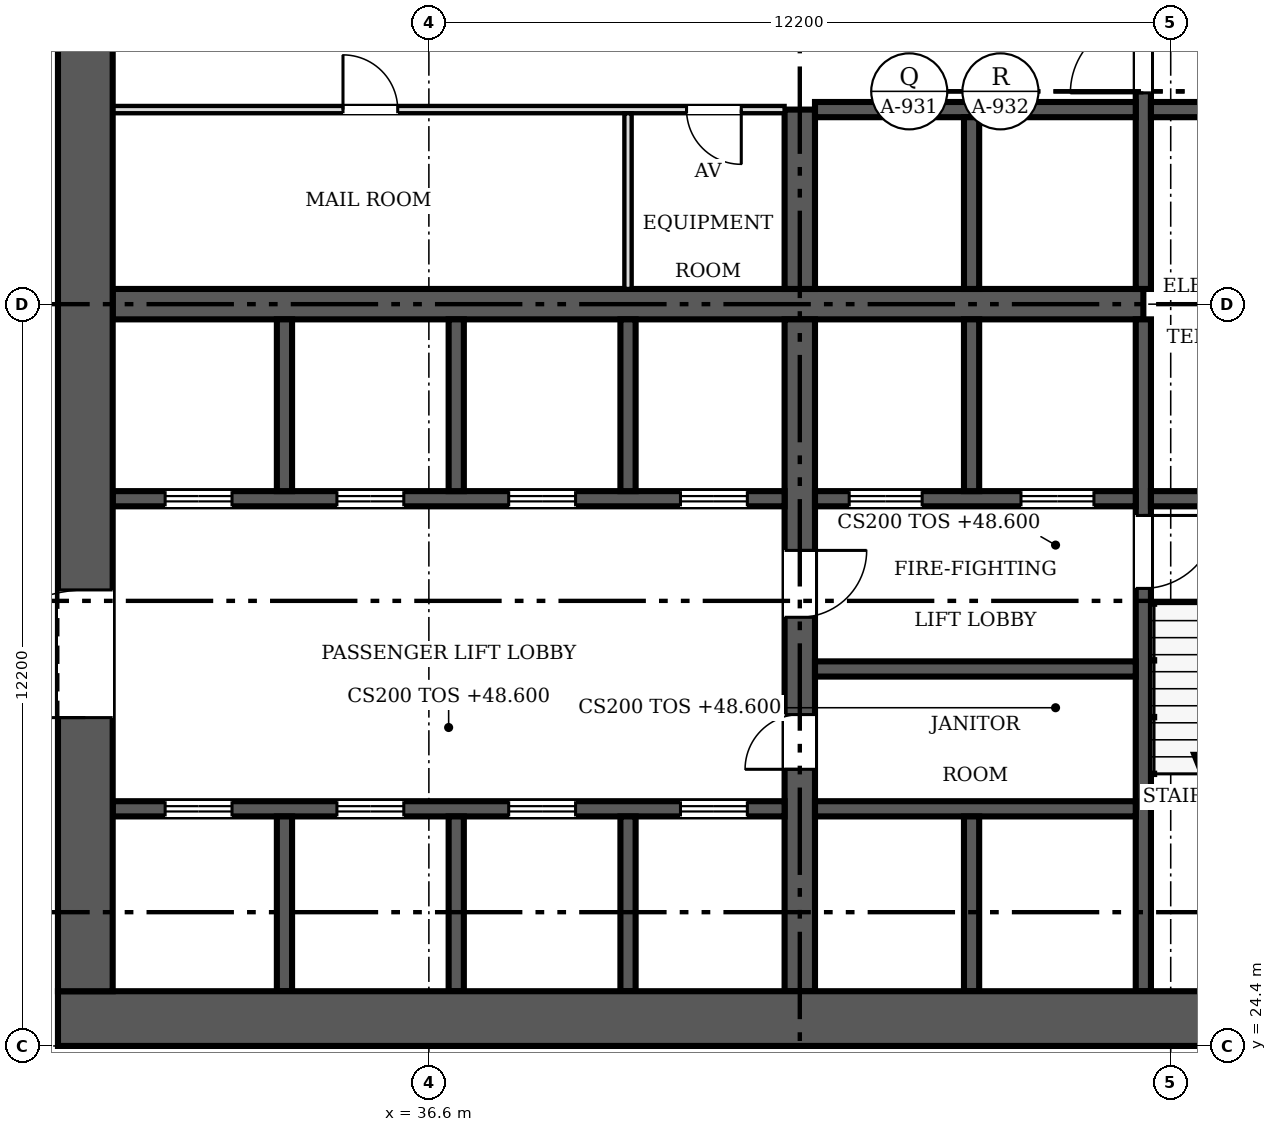
"""IFC4 building model, lengths in metres.
Left out: names, types, materials, properties, quantities, classifications, styles, units other than length and angle.
Written with IfcOpenShell. Run it as: python <this file> out.ifc"""

import sys

from ifc_helpers import new_model, si_unit, direction, frame, frame_2d, origin, place, context, subcontext, project, spatial, rectangle, extrude, source, transform, mapped, element, fill, save


model = new_model("IFC4")
c1 = context("Model", 3, precision=1e-05, world=origin(), true_north=direction((0.0, 1.0)))
c2 = subcontext(c1, "Body", "Model", "MODEL_VIEW")
j1 = project(units=[si_unit("LENGTHUNIT", "METRE"), si_unit("PLANEANGLEUNIT", "RADIAN")], contexts=[c1])
p1 = place(None, origin())
s1 = spatial("IfcSite", under=j1, at=p1, CompositionType="ELEMENT")
p2 = place(p1, origin())
s2 = spatial("IfcBuilding", under=s1, at=p2, CompositionType="ELEMENT")
p3 = place(p2, frame((0.0, 0.0, 48.6)))
s3 = spatial("IfcBuildingStorey", under=s2, at=p3, CompositionType="ELEMENT", Elevation=48.6)
p4 = place(p3, frame((54.9, 24.85, 0.0), z_axis=(0.0, 0.0, 1.0), x_axis=(-1.0, 0.0, 0.0)))
e1 = element("IfcWall", 1, at=p4, inside=s3, PredefinedType="SHEAR", context=c2, shape_type="SweptSolid", body=[
    extrude(rectangle(XDim=24.4, YDim=0.9, at=frame_2d((12.2, 0.0))), origin(), (0.0, 0.0, 1.0), 3.8),
])
m1 = source(origin(), c2, "Body", "SweptSolid", [
    extrude(rectangle(XDim=1.2, YDim=2.1, at=frame_2d((0.6, 1.05))), frame((0.0, 0.46, 0.0), z_axis=(0.0, -1.0, 0.0), x_axis=(1.0, 0.0, 0.0)), (0.0, 0.0, 1.0), 0.92),
])
p5 = place(p4, frame((1.5, 0.0, 0.0)))
e2 = element("IfcOpeningElement", 2, at=p5, cuts=e1, PredefinedType="OPENING", context=c2, shape_type="MappedRepresentation", body=[
    mapped(m1, transform((0.0, 0.0, 0.0), scale=1.0)),
])
p6 = place(p3, frame((30.95, 25.3, 0.0), z_axis=(0.0, 0.0, 1.0), x_axis=(0.0, 1.0, 0.0)))
e3 = element("IfcWall", 3, at=p6, inside=s3, PredefinedType="SHEAR", context=c2, shape_type="SweptSolid", body=[
    extrude(rectangle(XDim=22.6, YDim=0.9, at=frame_2d((11.3, 0.0))), origin(), (0.0, 0.0, 1.0), 3.8),
])
m2 = source(origin(), c2, "Body", "SweptSolid", [
    extrude(rectangle(XDim=2.1, YDim=2.4, at=frame_2d((1.05, 1.2))), frame((0.0, 0.46, 0.0), z_axis=(0.0, -1.0, 0.0), x_axis=(1.0, 0.0, 0.0)), (0.0, 0.0, 1.0), 0.92),
])
p7 = place(p6, frame((4.5, 0.0, 0.0)))
e4 = element("IfcOpeningElement", 4, at=p7, cuts=e3, PredefinedType="OPENING", context=c2, shape_type="MappedRepresentation", body=[
    mapped(m2, transform((0.0, 0.0, 0.0), scale=1.0)),
])
p8 = place(p6, frame((16.0, 0.0, 0.0)))
e5 = element("IfcOpeningElement", 5, at=p8, cuts=e3, PredefinedType="OPENING", context=c2, shape_type="MappedRepresentation", body=[
    mapped(m2, transform((0.0, 0.0, 0.0), scale=1.0)),
])
p9 = place(p3, frame((31.4, 36.6, 0.0), z_axis=(0.0, 0.0, 1.0), x_axis=(1.0, 0.0, 0.0)))
e6 = element("IfcWall", 6, at=p9, inside=s3, PredefinedType="SHEAR", context=c2, shape_type="SweptSolid", body=[
    extrude(rectangle(XDim=16.95, YDim=0.5, at=frame_2d((8.475, 0.0))), origin(), (0.0, 0.0, 1.0), 3.8),
])
p10 = place(p3, frame((42.7, 36.35, 0.0), z_axis=(0.0, 0.0, 1.0), x_axis=(0.0, -1.0, 0.0)))
e7 = element("IfcWall", 7, at=p10, inside=s3, PredefinedType="SHEAR", context=c2, shape_type="SweptSolid", body=[
    extrude(rectangle(XDim=11.05, YDim=0.5, at=frame_2d((5.525, 0.0))), origin(), (0.0, 0.0, 1.0), 3.8),
])
m3 = source(origin(), c2, "Body", "SweptSolid", [
    extrude(rectangle(XDim=0.9, YDim=2.1, at=frame_2d((0.45, 1.05))), frame((0.0, 0.26, 0.0), z_axis=(0.0, -1.0, 0.0), x_axis=(1.0, 0.0, 0.0)), (0.0, 0.0, 1.0), 0.52),
])
p11 = place(p10, frame((6.5, 0.0, 0.0)))
e8 = element("IfcOpeningElement", 8, at=p11, cuts=e7, PredefinedType="OPENING", context=c2, shape_type="MappedRepresentation", body=[
    mapped(m3, transform((0.0, 0.0, 0.0), scale=1.0)),
])
m4 = source(origin(), c2, "Body", "SweptSolid", [
    extrude(rectangle(XDim=1.1, YDim=2.1, at=frame_2d((0.55, 1.05))), frame((0.0, 0.26, 0.0), z_axis=(0.0, -1.0, 0.0), x_axis=(1.0, 0.0, 0.0)), (0.0, 0.0, 1.0), 0.52),
])
p12 = place(p10, frame((3.8, 0.0, 0.0)))
e9 = element("IfcOpeningElement", 9, at=p12, cuts=e7, PredefinedType="OPENING", context=c2, shape_type="MappedRepresentation", body=[
    mapped(m4, transform((0.0, 0.0, 0.0), scale=1.0)),
])
p13 = place(p3, frame((42.7, 36.85, 0.0), z_axis=(0.0, 0.0, 1.0), x_axis=(0.0, 1.0, 0.0)))
e10 = element("IfcWall", 10, at=p13, inside=s3, PredefinedType="SHEAR", context=c2, shape_type="SweptSolid", body=[
    extrude(rectangle(XDim=2.95, YDim=0.5, at=frame_2d((1.475, 0.0))), origin(), (0.0, 0.0, 1.0), 3.8),
])
p14 = place(p3, frame((48.35, 36.35, 0.0), z_axis=(0.0, 0.0, 1.0), x_axis=(0.0, -1.0, 0.0)))
e11 = element("IfcWall", 11, at=p14, inside=s3, PredefinedType="SOLIDWALL", context=c2, shape_type="SweptSolid", body=[
    extrude(rectangle(XDim=11.05, YDim=0.25, at=frame_2d((5.525, 0.0))), origin(), (0.0, 0.0, 1.0), 3.8),
])
m5 = source(origin(), c2, "Body", "SweptSolid", [
    extrude(rectangle(XDim=1.2, YDim=2.1, at=frame_2d((0.6, 1.05))), frame((0.0, 0.135, 0.0), z_axis=(0.0, -1.0, 0.0), x_axis=(1.0, 0.0, 0.0)), (0.0, 0.0, 1.0), 0.27),
])
p15 = place(p14, frame((3.225, 0.0, 0.0)))
e12 = element("IfcOpeningElement", 12, at=p15, cuts=e11, PredefinedType="OPENING", context=c2, shape_type="MappedRepresentation", body=[
    mapped(m5, transform((0.0, 0.0, 0.0), scale=1.0)),
])
p16 = place(p3, frame((48.35, 47.9, 0.0), z_axis=(0.0, 0.0, 1.0), x_axis=(0.0, -1.0, 0.0)))
e13 = element("IfcWall", 13, at=p16, inside=s3, PredefinedType="SOLIDWALL", context=c2, shape_type="SweptSolid", body=[
    extrude(rectangle(XDim=11.05, YDim=0.25, at=frame_2d((5.525, 0.0))), origin(), (0.0, 0.0, 1.0), 3.8),
])
p17 = place(p16, frame((6.625, 0.0, 0.0)))
e14 = element("IfcOpeningElement", 14, at=p17, cuts=e13, PredefinedType="OPENING", context=c2, shape_type="MappedRepresentation", body=[
    mapped(m5, transform((0.0, 0.0, 0.0), scale=1.0)),
])
p18 = place(p3, frame((42.45, 33.4, 0.0), z_axis=(0.0, 0.0, 1.0), x_axis=(-1.0, 0.0, 0.0)))
e15 = element("IfcWall", 15, at=p18, inside=s3, PredefinedType="SOLIDWALL", context=c2, shape_type="SweptSolid", body=[
    extrude(rectangle(XDim=11.05, YDim=0.25, at=frame_2d((5.525, 0.0))), origin(), (0.0, 0.0, 1.0), 3.8),
])
m6 = source(origin(), c2, "Body", "SweptSolid", [
    extrude(rectangle(XDim=1.1, YDim=2.1, at=frame_2d((0.55, 1.05))), frame((0.0, 0.135, 0.0), z_axis=(0.0, -1.0, 0.0), x_axis=(1.0, 0.0, 0.0)), (0.0, 0.0, 1.0), 0.27),
])
p19 = place(p18, frame((9.087, 0.0, 0.0)))
e16 = element("IfcOpeningElement", 16, at=p19, cuts=e15, PredefinedType="OPENING", context=c2, shape_type="MappedRepresentation", body=[
    mapped(m6, transform((0.0, 0.0, 0.0), scale=1.0)),
])
p20 = place(p18, frame((6.262, 0.0, 0.0)))
e17 = element("IfcOpeningElement", 17, at=p20, cuts=e15, PredefinedType="OPENING", context=c2, shape_type="MappedRepresentation", body=[
    mapped(m6, transform((0.0, 0.0, 0.0), scale=1.0)),
])
p21 = place(p18, frame((3.438, 0.0, 0.0)))
e18 = element("IfcOpeningElement", 18, at=p21, cuts=e15, PredefinedType="OPENING", context=c2, shape_type="MappedRepresentation", body=[
    mapped(m6, transform((0.0, 0.0, 0.0), scale=1.0)),
])
p22 = place(p18, frame((0.613, 0.0, 0.0)))
e19 = element("IfcOpeningElement", 19, at=p22, cuts=e15, PredefinedType="OPENING", context=c2, shape_type="MappedRepresentation", body=[
    mapped(m6, transform((0.0, 0.0, 0.0), scale=1.0)),
])
p23 = place(p3, frame((48.225, 33.4, 0.0), z_axis=(0.0, 0.0, 1.0), x_axis=(-1.0, 0.0, 0.0)))
e20 = element("IfcWall", 20, at=p23, inside=s3, PredefinedType="SOLIDWALL", context=c2, shape_type="SweptSolid", body=[
    extrude(rectangle(XDim=5.275, YDim=0.25, at=frame_2d((2.638, 0.0))), origin(), (0.0, 0.0, 1.0), 3.8),
])
p24 = place(p23, frame((3.512, 0.0, 0.0)))
e21 = element("IfcOpeningElement", 21, at=p24, cuts=e20, PredefinedType="OPENING", context=c2, shape_type="MappedRepresentation", body=[
    mapped(m5, transform((0.0, 0.0, 0.0), scale=1.0)),
])
p25 = place(p23, frame((0.688, 0.0, 0.0)))
e22 = element("IfcOpeningElement", 22, at=p25, cuts=e20, PredefinedType="OPENING", context=c2, shape_type="MappedRepresentation", body=[
    mapped(m5, transform((0.0, 0.0, 0.0), scale=1.0)),
])
p26 = place(p3, frame((48.475, 33.4, 0.0), z_axis=(0.0, 0.0, 1.0), x_axis=(1.0, 0.0, 0.0)))
e23 = element("IfcWall", 23, at=p26, inside=s3, PredefinedType="SOLIDWALL", context=c2, shape_type="SweptSolid", body=[
    extrude(rectangle(XDim=3.525, YDim=0.25, at=frame_2d((1.762, 0.0))), origin(), (0.0, 0.0, 1.0), 3.8),
])
p27 = place(p3, frame((31.4, 28.3, 0.0), z_axis=(0.0, 0.0, 1.0), x_axis=(1.0, 0.0, 0.0)))
e24 = element("IfcWall", 24, at=p27, inside=s3, PredefinedType="SOLIDWALL", context=c2, shape_type="SweptSolid", body=[
    extrude(rectangle(XDim=11.05, YDim=0.25, at=frame_2d((5.525, 0.0))), origin(), (0.0, 0.0, 1.0), 3.8),
])
p28 = place(p27, frame((0.863, 0.0, 0.0)))
e25 = element("IfcOpeningElement", 25, at=p28, cuts=e24, PredefinedType="OPENING", context=c2, shape_type="MappedRepresentation", body=[
    mapped(m6, transform((0.0, 0.0, 0.0), scale=1.0)),
])
p29 = place(p27, frame((3.688, 0.0, 0.0)))
e26 = element("IfcOpeningElement", 26, at=p29, cuts=e24, PredefinedType="OPENING", context=c2, shape_type="MappedRepresentation", body=[
    mapped(m6, transform((0.0, 0.0, 0.0), scale=1.0)),
])
p30 = place(p27, frame((6.512, 0.0, 0.0)))
e27 = element("IfcOpeningElement", 27, at=p30, cuts=e24, PredefinedType="OPENING", context=c2, shape_type="MappedRepresentation", body=[
    mapped(m6, transform((0.0, 0.0, 0.0), scale=1.0)),
])
p31 = place(p27, frame((9.337, 0.0, 0.0)))
e28 = element("IfcOpeningElement", 28, at=p31, cuts=e24, PredefinedType="OPENING", context=c2, shape_type="MappedRepresentation", body=[
    mapped(m6, transform((0.0, 0.0, 0.0), scale=1.0)),
])
for number, where, z_axis, x_axis in (
    (29, (42.95, 28.3, 0.0), (0.0, 0.0, 1.0), (1.0, 0.0, 0.0)),
    (30, (42.95, 39.8, 0.0), (0.0, 0.0, 1.0), (1.0, 0.0, 0.0)),
):
    element("IfcWall", number, at=place(p3, frame(where, z_axis=z_axis, x_axis=x_axis)), inside=s3, PredefinedType="SOLIDWALL", context=c2, shape_type="SweptSolid", body=[
        extrude(rectangle(XDim=5.275, YDim=0.25, at=frame_2d((2.638, 0.0))), origin(), (0.0, 0.0, 1.0), 3.8),
    ])
p32 = place(p3, frame((48.475, 39.8, 0.0), z_axis=(0.0, 0.0, 1.0), x_axis=(1.0, 0.0, 0.0)))
e31 = element("IfcWall", 31, at=p32, inside=s3, PredefinedType="SOLIDWALL", context=c2, shape_type="SweptSolid", body=[
    extrude(rectangle(XDim=3.525, YDim=0.25, at=frame_2d((1.762, 0.0))), origin(), (0.0, 0.0, 1.0), 3.8),
])
p33 = place(p3, frame((45.525, 33.525, 0.0), z_axis=(0.0, 0.0, 1.0), x_axis=(0.0, 1.0, 0.0)))
e32 = element("IfcWall", 32, at=p33, inside=s3, PredefinedType="SOLIDWALL", context=c2, shape_type="SweptSolid", body=[
    extrude(rectangle(XDim=2.825, YDim=0.25, at=frame_2d((1.413, 0.0))), origin(), (0.0, 0.0, 1.0), 3.8),
])
p34 = place(p3, frame((45.525, 36.85, 0.0), z_axis=(0.0, 0.0, 1.0), x_axis=(0.0, 1.0, 0.0)))
e33 = element("IfcWall", 33, at=p34, inside=s3, PredefinedType="SOLIDWALL", context=c2, shape_type="SweptSolid", body=[
    extrude(rectangle(XDim=2.825, YDim=0.25, at=frame_2d((1.413, 0.0))), origin(), (0.0, 0.0, 1.0), 3.8),
])
p35 = place(p3, frame((42.95, 30.6, 0.0), z_axis=(0.0, 0.0, 1.0), x_axis=(1.0, 0.0, 0.0)))
e34 = element("IfcWall", 34, at=p35, inside=s3, PredefinedType="SOLIDWALL", context=c2, shape_type="SweptSolid", body=[
    extrude(rectangle(XDim=5.275, YDim=0.25, at=frame_2d((2.638, 0.0))), origin(), (0.0, 0.0, 1.0), 3.8),
])
for number, where, z_axis, x_axis in (
    (35, (34.225, 33.525, 0.0), (0.0, 0.0, 1.0), (0.0, 1.0, 0.0)),
    (36, (37.05, 33.525, 0.0), (0.0, 0.0, 1.0), (0.0, 1.0, 0.0)),
    (37, (39.875, 33.525, 0.0), (0.0, 0.0, 1.0), (0.0, 1.0, 0.0)),
):
    element("IfcWall", number, at=place(p3, frame(where, z_axis=z_axis, x_axis=x_axis)), inside=s3, PredefinedType="SOLIDWALL", context=c2, shape_type="SweptSolid", body=[
        extrude(rectangle(XDim=2.825, YDim=0.25, at=frame_2d((1.413, 0.0))), origin(), (0.0, 0.0, 1.0), 3.8),
    ])
for number, where, z_axis, x_axis in (
    (38, (34.225, 25.3, 0.0), (0.0, 0.0, 1.0), (0.0, 1.0, 0.0)),
    (39, (37.05, 25.3, 0.0), (0.0, 0.0, 1.0), (0.0, 1.0, 0.0)),
    (40, (39.875, 25.3, 0.0), (0.0, 0.0, 1.0), (0.0, 1.0, 0.0)),
    (41, (45.525, 25.3, 0.0), (0.0, 0.0, 1.0), (0.0, 1.0, 0.0)),
):
    element("IfcWall", number, at=place(p3, frame(where, z_axis=z_axis, x_axis=x_axis)), inside=s3, PredefinedType="SOLIDWALL", context=c2, shape_type="SweptSolid", body=[
        extrude(rectangle(XDim=2.875, YDim=0.25, at=frame_2d((1.438, 0.0))), origin(), (0.0, 0.0, 1.0), 3.8),
    ])
p36 = place(p3, frame((42.45, 39.8, 0.0), z_axis=(0.0, 0.0, 1.0), x_axis=(-1.0, 0.0, 0.0)))
e42 = element("IfcWall", 42, at=p36, inside=s3, PredefinedType="PARTITIONING", context=c2, shape_type="SweptSolid", body=[
    extrude(rectangle(XDim=11.05, YDim=0.12, at=frame_2d((5.525, 0.0))), origin(), (0.0, 0.0, 1.0), 3.6),
])
m7 = source(origin(), c2, "Body", "SweptSolid", [
    extrude(rectangle(XDim=0.9, YDim=2.1, at=frame_2d((0.45, 1.05))), frame((0.0, 0.07, 0.0), z_axis=(0.0, -1.0, 0.0), x_axis=(1.0, 0.0, 0.0)), (0.0, 0.0, 1.0), 0.14),
])
p37 = place(p36, frame((6.363, 0.0, 0.0)))
e43 = element("IfcOpeningElement", 43, at=p37, cuts=e42, PredefinedType="OPENING", context=c2, shape_type="MappedRepresentation", body=[
    mapped(m7, transform((0.0, 0.0, 0.0), scale=1.0)),
])
p38 = place(p36, frame((0.712, 0.0, 0.0)))
e44 = element("IfcOpeningElement", 44, at=p38, cuts=e42, PredefinedType="OPENING", context=c2, shape_type="MappedRepresentation", body=[
    mapped(m7, transform((0.0, 0.0, 0.0), scale=1.0)),
])
p39 = place(p3, frame((39.875, 36.85, 0.0), z_axis=(0.0, 0.0, 1.0), x_axis=(0.0, 1.0, 0.0)))
e45 = element("IfcWall", 45, at=p39, inside=s3, PredefinedType="PARTITIONING", context=c2, shape_type="SweptSolid", body=[
    extrude(rectangle(XDim=2.89, YDim=0.12, at=frame_2d((1.445, 0.0))), origin(), (0.0, 0.0, 1.0), 3.6),
])
m8 = source(origin(), c2, "Body", "SweptSolid", [
    extrude(rectangle(XDim=2.1, YDim=2.4, at=frame_2d((1.05, 1.2))), frame((0.0, 0.025, 0.0), z_axis=(0.0, -1.0, 0.0), x_axis=(1.0, 0.0, 0.0)), (0.0, 0.0, 1.0), 0.05),
])
p40 = place(p7, origin())
e46 = element("IfcDoor", 46, at=p40, inside=s3, OperationType="DOUBLE_DOOR_SINGLE_SWING", PredefinedType="DOOR", context=c2, shape_type="MappedRepresentation", body=[
    mapped(m8, transform((0.0, 0.0, 0.0), scale=1.0)),
])
fill(e4, e46)
m9 = source(origin(), c2, "Body", "SweptSolid", [
    extrude(rectangle(XDim=0.9, YDim=2.1, at=frame_2d((0.45, 1.05))), frame((0.0, 0.025, 0.0), z_axis=(0.0, -1.0, 0.0), x_axis=(1.0, 0.0, 0.0)), (0.0, 0.0, 1.0), 0.05),
])
p41 = place(p11, origin())
e47 = element("IfcDoor", 47, at=p41, inside=s3, OperationType="SINGLE_SWING_RIGHT", PredefinedType="DOOR", context=c2, shape_type="MappedRepresentation", body=[
    mapped(m9, transform((0.0, 0.0, 0.0), scale=1.0)),
])
fill(e8, e47)
m10 = source(origin(), c2, "Body", "SweptSolid", [
    extrude(rectangle(XDim=1.1, YDim=2.1, at=frame_2d((0.55, 1.05))), frame((0.0, 0.025, 0.0), z_axis=(0.0, -1.0, 0.0), x_axis=(1.0, 0.0, 0.0)), (0.0, 0.0, 1.0), 0.05),
])
p42 = place(p12, origin())
e48 = element("IfcDoor", 48, at=p42, inside=s3, OperationType="SINGLE_SWING_LEFT", PredefinedType="DOOR", context=c2, shape_type="MappedRepresentation", body=[
    mapped(m10, transform((0.0, 0.0, 0.0), scale=1.0)),
])
fill(e9, e48)
m11 = source(origin(), c2, "Body", "SweptSolid", [
    extrude(rectangle(XDim=1.2, YDim=2.1, at=frame_2d((0.6, 1.05))), frame((0.0, 0.025, 0.0), z_axis=(0.0, -1.0, 0.0), x_axis=(1.0, 0.0, 0.0)), (0.0, 0.0, 1.0), 0.05),
])
p43 = place(p15, origin())
e49 = element("IfcDoor", 49, at=p43, inside=s3, OperationType="SINGLE_SWING_LEFT", PredefinedType="DOOR", context=c2, shape_type="MappedRepresentation", body=[
    mapped(m11, transform((0.0, 0.0, 0.0), scale=1.0)),
])
fill(e12, e49)
p44 = place(p17, origin())
e50 = element("IfcDoor", 50, at=p44, inside=s3, OperationType="SINGLE_SWING_RIGHT", PredefinedType="DOOR", context=c2, shape_type="MappedRepresentation", body=[
    mapped(m11, transform((0.0, 0.0, 0.0), scale=1.0)),
])
fill(e14, e50)
p45 = place(p19, origin())
e51 = element("IfcDoor", 51, at=p45, inside=s3, OperationType="DOUBLE_DOOR_SLIDING", PredefinedType="DOOR", context=c2, shape_type="MappedRepresentation", body=[
    mapped(m10, transform((0.0, 0.0, 0.0), scale=1.0)),
])
fill(e16, e51)
p46 = place(p20, origin())
e52 = element("IfcDoor", 52, at=p46, inside=s3, OperationType="DOUBLE_DOOR_SLIDING", PredefinedType="DOOR", context=c2, shape_type="MappedRepresentation", body=[
    mapped(m10, transform((0.0, 0.0, 0.0), scale=1.0)),
])
fill(e17, e52)
p47 = place(p21, origin())
e53 = element("IfcDoor", 53, at=p47, inside=s3, OperationType="DOUBLE_DOOR_SLIDING", PredefinedType="DOOR", context=c2, shape_type="MappedRepresentation", body=[
    mapped(m10, transform((0.0, 0.0, 0.0), scale=1.0)),
])
fill(e18, e53)
p48 = place(p22, origin())
e54 = element("IfcDoor", 54, at=p48, inside=s3, OperationType="DOUBLE_DOOR_SLIDING", PredefinedType="DOOR", context=c2, shape_type="MappedRepresentation", body=[
    mapped(m10, transform((0.0, 0.0, 0.0), scale=1.0)),
])
fill(e19, e54)
p49 = place(p24, origin())
e55 = element("IfcDoor", 55, at=p49, inside=s3, OperationType="DOUBLE_DOOR_SLIDING", PredefinedType="DOOR", context=c2, shape_type="MappedRepresentation", body=[
    mapped(m11, transform((0.0, 0.0, 0.0), scale=1.0)),
])
fill(e21, e55)
p50 = place(p25, origin())
e56 = element("IfcDoor", 56, at=p50, inside=s3, OperationType="DOUBLE_DOOR_SLIDING", PredefinedType="DOOR", context=c2, shape_type="MappedRepresentation", body=[
    mapped(m11, transform((0.0, 0.0, 0.0), scale=1.0)),
])
fill(e22, e56)
p51 = place(p28, origin())
e57 = element("IfcDoor", 57, at=p51, inside=s3, OperationType="DOUBLE_DOOR_SLIDING", PredefinedType="DOOR", context=c2, shape_type="MappedRepresentation", body=[
    mapped(m10, transform((0.0, 0.0, 0.0), scale=1.0)),
])
fill(e25, e57)
p52 = place(p29, origin())
e58 = element("IfcDoor", 58, at=p52, inside=s3, OperationType="DOUBLE_DOOR_SLIDING", PredefinedType="DOOR", context=c2, shape_type="MappedRepresentation", body=[
    mapped(m10, transform((0.0, 0.0, 0.0), scale=1.0)),
])
fill(e26, e58)
p53 = place(p30, origin())
e59 = element("IfcDoor", 59, at=p53, inside=s3, OperationType="DOUBLE_DOOR_SLIDING", PredefinedType="DOOR", context=c2, shape_type="MappedRepresentation", body=[
    mapped(m10, transform((0.0, 0.0, 0.0), scale=1.0)),
])
fill(e27, e59)
p54 = place(p31, origin())
e60 = element("IfcDoor", 60, at=p54, inside=s3, OperationType="DOUBLE_DOOR_SLIDING", PredefinedType="DOOR", context=c2, shape_type="MappedRepresentation", body=[
    mapped(m10, transform((0.0, 0.0, 0.0), scale=1.0)),
])
fill(e28, e60)
p55 = place(p37, origin())
e61 = element("IfcDoor", 61, at=p55, inside=s3, OperationType="SINGLE_SWING_RIGHT", PredefinedType="DOOR", context=c2, shape_type="MappedRepresentation", body=[
    mapped(m9, transform((0.0, 0.0, 0.0), scale=1.0)),
])
fill(e43, e61)
p56 = place(p38, origin())
e62 = element("IfcDoor", 62, at=p56, inside=s3, OperationType="SINGLE_SWING_LEFT", PredefinedType="DOOR", context=c2, shape_type="MappedRepresentation", body=[
    mapped(m9, transform((0.0, 0.0, 0.0), scale=1.0)),
])
fill(e44, e62)
save(model, sys.argv[1])
